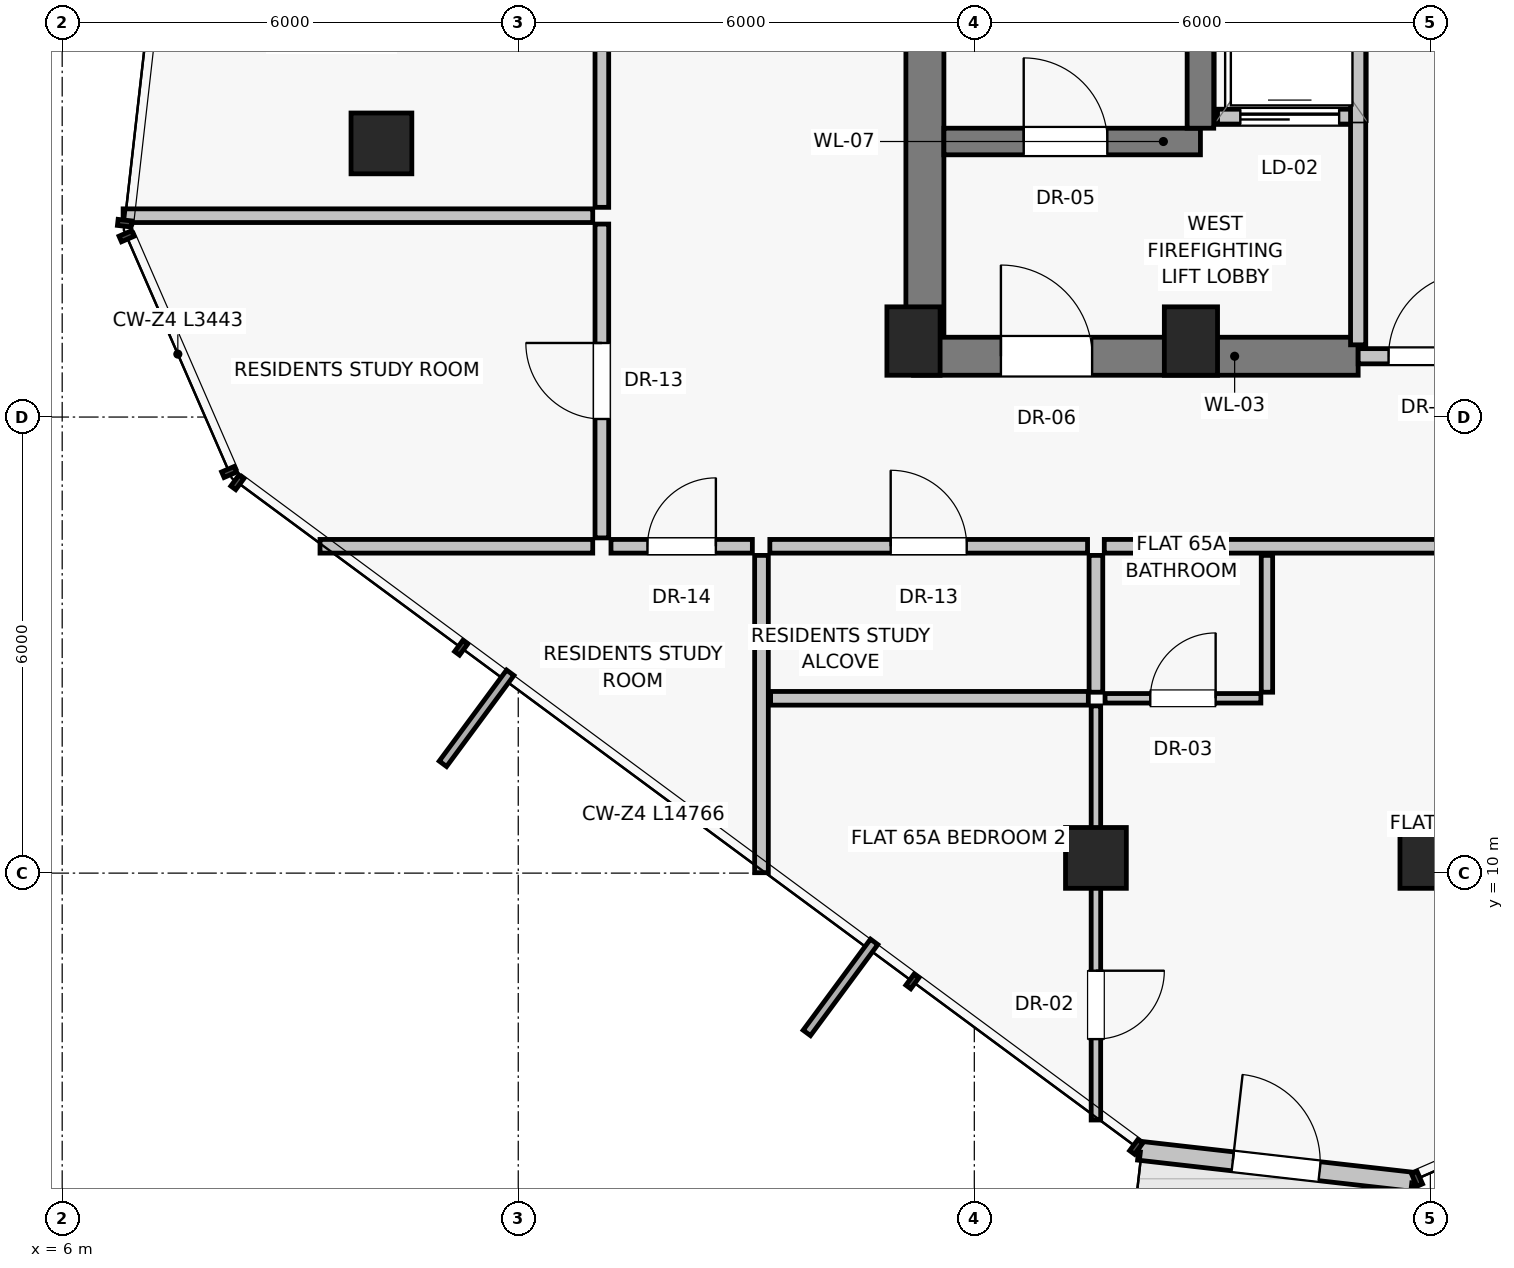
"""IFC4 building model, lengths in metres.
Left out: names, types, materials, properties, quantities, classifications, styles, units other than length and angle.
Written with IfcOpenShell. Run it as: python <this file> out.ifc"""

import sys

from ifc_helpers import new_model, si_unit, direction, frame, frame_2d, origin, origin_2d, place, context, subcontext, project, spatial, rectangle, extrude, source, transform, mapped, element, fill, save


model = new_model("IFC4")
c1 = context("Model", 3, precision=1e-05, world=origin(), true_north=direction((0.0, 1.0)))
c2 = subcontext(c1, "Body", "Model", "MODEL_VIEW")
j1 = project(units=[si_unit("LENGTHUNIT", "METRE"), si_unit("PLANEANGLEUNIT", "RADIAN")], contexts=[c1])
p1 = place(None, origin())
s1 = spatial("IfcSite", under=j1, at=p1, CompositionType="ELEMENT")
p2 = place(p1, origin())
s2 = spatial("IfcBuilding", under=s1, at=p2, CompositionType="ELEMENT")
p3 = place(p2, frame((0.0, 0.0, 230.05)))
s3 = spatial("IfcBuildingStorey", under=s2, at=p3, CompositionType="ELEMENT", Elevation=230.05)
for number, where, z_axis, x_axis in (
    (1, (17.2, 17.0, 0.0), (0.0, 0.0, 1.0), (1.0, 0.0, 0.0)),
    (2, (20.85, 17.0, 0.0), (0.0, 0.0, 1.0), (1.0, 0.0, 0.0)),
):
    element("IfcColumn", number, at=place(p3, frame(where, z_axis=z_axis, x_axis=x_axis)), inside=s3, PredefinedType="PILASTER", context=c2, shape_type="SweptSolid", body=[
        extrude(rectangle(XDim=0.7, YDim=0.9, at=origin_2d()), origin(), (0.0, 0.0, 1.0), 3.25),
    ])
for number, where, z_axis, x_axis in (
    (3, (10.2, 19.6, -0.235), (0.0, 0.0, 1.0), (1.0, 0.0, 0.0)),
    (4, (19.6, 10.2, -0.235), (0.0, 0.0, 1.0), (1.0, 0.0, 0.0)),
    (5, (24.0, 10.2, -0.235), (0.0, 0.0, 1.0), (1.0, 0.0, 0.0)),
):
    element("IfcColumn", number, at=place(p3, frame(where, z_axis=z_axis, x_axis=x_axis)), inside=s3, PredefinedType="COLUMN", context=c2, shape_type="SweptSolid", body=[
        extrude(rectangle(XDim=0.8, YDim=0.8, at=origin_2d()), origin(), (0.0, 0.0, 1.0), 3.485),
    ])
p4 = place(p3, frame((20.162, 6.349, 0.0), z_axis=(0.0, 0.0, 1.0), x_axis=(0.993617723706, -0.112799907521, 0.0)))
e6 = element("IfcWall", 6, at=p4, inside=s3, PredefinedType="SOLIDWALL", context=c2, shape_type="SweptSolid", body=[
    extrude(rectangle(XDim=3.643, YDim=0.25, at=frame_2d((1.821, 0.0))), origin(), (0.0, 0.0, 1.0), 3.015),
])
p5 = place(p4, frame((1.246, 0.0, 0.0)))
e7 = element("IfcOpeningElement", 7, at=p5, cuts=e6, PredefinedType="OPENING", context=c2, shape_type="SweptSolid", body=[
    extrude(rectangle(XDim=1.15, YDim=2.25, at=frame_2d((0.575, 1.125))), frame((0.0, 0.135, 0.0), z_axis=(0.0, -1.0, 0.0), x_axis=(1.0, 0.0, 0.0)), (0.0, 0.0, 1.0), 0.27),
])
p6 = place(p3, frame((17.35, 16.8, 0.0), z_axis=(0.0, 0.0, 1.0), x_axis=(0.0, 1.0, 0.0)))
e8 = element("IfcWall", 8, at=p6, inside=s3, PredefinedType="SHEAR", context=c2, shape_type="SweptSolid", body=[
    extrude(rectangle(XDim=14.2, YDim=0.5, at=frame_2d((7.1, 0.0))), origin(), (0.0, 0.0, 1.0), 3.015),
])
p7 = place(p3, frame((17.2, 16.8, 0.0), z_axis=(0.0, 0.0, 1.0), x_axis=(1.0, 0.0, 0.0)))
e9 = element("IfcWall", 9, at=p7, inside=s3, PredefinedType="SHEAR", context=c2, shape_type="SweptSolid", body=[
    extrude(rectangle(XDim=5.85, YDim=0.5, at=frame_2d((2.925, 0.0))), origin(), (0.0, 0.0, 1.0), 3.015),
])
p8 = place(p7, frame((1.15, 0.0, 0.0)))
e10 = element("IfcOpeningElement", 10, at=p8, cuts=e9, PredefinedType="OPENING", context=c2, shape_type="SweptSolid", body=[
    extrude(rectangle(XDim=1.2, YDim=2.03, at=frame_2d((0.6, 1.015))), frame((0.0, 0.26, 0.0), z_axis=(0.0, -1.0, 0.0), x_axis=(1.0, 0.0, 0.0)), (0.0, 0.0, 1.0), 0.52),
])
p9 = place(p3, frame((23.05, 16.8, 0.0), z_axis=(0.0, 0.0, 1.0), x_axis=(1.0, 0.0, 0.0)))
e11 = element("IfcWall", 11, at=p9, inside=s3, PredefinedType="SOLIDWALL", context=c2, shape_type="SweptSolid", body=[
    extrude(rectangle(XDim=1.9, YDim=0.2, at=frame_2d((0.95, 0.0))), origin(), (0.0, 0.0, 1.0), 2.165),
])
p10 = place(p9, frame((0.4, 0.0, 0.0)))
e12 = element("IfcOpeningElement", 12, at=p10, cuts=e11, PredefinedType="OPENING", context=c2, shape_type="SweptSolid", body=[
    extrude(rectangle(XDim=1.1, YDim=2.03, at=frame_2d((0.55, 1.015))), frame((0.0, 0.11, 0.0), z_axis=(0.0, -1.0, 0.0), x_axis=(1.0, 0.0, 0.0)), (0.0, 0.0, 1.0), 0.22),
])
p11 = place(p3, frame((17.6, 19.625, 0.0), z_axis=(0.0, 0.0, 1.0), x_axis=(1.0, 0.0, 0.0)))
e13 = element("IfcWall", 13, at=p11, inside=s3, PredefinedType="SHEAR", context=c2, shape_type="SweptSolid", body=[
    extrude(rectangle(XDim=3.375, YDim=0.35, at=frame_2d((1.688, 0.0))), origin(), (0.0, 0.0, 1.0), 3.015),
])
p12 = place(p11, frame((1.05, 0.0, 0.0)))
e14 = element("IfcOpeningElement", 14, at=p12, cuts=e13, PredefinedType="OPENING", context=c2, shape_type="SweptSolid", body=[
    extrude(rectangle(XDim=1.1, YDim=2.03, at=frame_2d((0.55, 1.015))), frame((0.0, 0.185, 0.0), z_axis=(0.0, -1.0, 0.0), x_axis=(1.0, 0.0, 0.0)), (0.0, 0.0, 1.0), 0.37),
])
p13 = place(p3, frame((21.2, 19.95, 0.0), z_axis=(0.0, 0.0, 1.0), x_axis=(1.0, 0.0, 0.0)))
e15 = element("IfcWall", 15, at=p13, inside=s3, PredefinedType="SOLIDWALL", context=c2, shape_type="SweptSolid", body=[
    extrude(rectangle(XDim=1.85, YDim=0.2, at=frame_2d((0.925, 0.0))), origin(), (0.0, 0.0, 1.0), 3.015),
])
p14 = place(p13, frame((0.3, 0.0, 0.0)))
e16 = element("IfcOpeningElement", 16, at=p14, cuts=e15, PredefinedType="OPENING", context=c2, shape_type="SweptSolid", body=[
    extrude(rectangle(XDim=1.3, YDim=2.25, at=frame_2d((0.65, 1.125))), frame((0.0, 0.11, 0.0), z_axis=(0.0, -1.0, 0.0), x_axis=(1.0, 0.0, 0.0)), (0.0, 0.0, 1.0), 0.22),
])
p15 = place(p3, frame((20.975, 19.8, 0.0), z_axis=(0.0, 0.0, 1.0), x_axis=(0.0, 1.0, 0.0)))
e17 = element("IfcWall", 17, at=p15, inside=s3, PredefinedType="SHEAR", context=c2, shape_type="SweptSolid", body=[
    extrude(rectangle(XDim=8.775, YDim=0.35, at=frame_2d((4.387, 0.0))), origin(), (0.0, 0.0, 1.0), 3.015),
])
p16 = place(p3, frame((23.05, 16.95, 0.0), z_axis=(0.0, 0.0, 1.0), x_axis=(0.0, 1.0, 0.0)))
e18 = element("IfcWall", 18, at=p16, inside=s3, PredefinedType="SOLIDWALL", context=c2, shape_type="SweptSolid", body=[
    extrude(rectangle(XDim=5.6, YDim=0.2, at=frame_2d((2.8, 0.0))), origin(), (0.0, 0.0, 1.0), 3.015),
])
p17 = place(p3, frame((15.2, 14.18, 0.0), z_axis=(0.0, 0.0, 1.0), x_axis=(0.0, -1.0, 0.0)))
e19 = element("IfcWall", 19, at=p17, inside=s3, PredefinedType="PARTITIONING", context=c2, shape_type="SweptSolid", body=[
    extrude(rectangle(XDim=4.175, YDim=0.18, at=frame_2d((2.087, 0.0))), origin(), (0.0, 0.0, 1.0), 3.015),
])
p18 = place(p3, frame((15.31, 14.3, 0.0), z_axis=(0.0, 0.0, 1.0), x_axis=(1.0, 0.0, 0.0)))
e20 = element("IfcWall", 20, at=p18, inside=s3, PredefinedType="PARTITIONING", context=c2, shape_type="SweptSolid", body=[
    extrude(rectangle(XDim=4.18, YDim=0.18, at=frame_2d((2.09, 0.0))), origin(), (0.0, 0.0, 1.0), 3.015),
])
p19 = place(p18, frame((1.59, 0.0, 0.0)))
e21 = element("IfcOpeningElement", 21, at=p19, cuts=e20, PredefinedType="OPENING", context=c2, shape_type="SweptSolid", body=[
    extrude(rectangle(XDim=1.0, YDim=2.01, at=frame_2d((0.5, 1.005))), frame((0.0, 0.1, 0.0), z_axis=(0.0, -1.0, 0.0), x_axis=(1.0, 0.0, 0.0)), (0.0, 0.0, 1.0), 0.2),
])
p20 = place(p3, frame((19.71, 14.3, 0.0), z_axis=(0.0, 0.0, 1.0), x_axis=(1.0, 0.0, 0.0)))
e22 = element("IfcWall", 22, at=p20, inside=s3, PredefinedType="PARTITIONING", context=c2, shape_type="SweptSolid", body=[
    extrude(rectangle(XDim=11.38, YDim=0.18, at=frame_2d((5.69, 0.0))), origin(), (0.0, 0.0, 1.0), 3.015),
])
p21 = place(p20, frame((4.94, 0.0, 0.0)))
e23 = element("IfcOpeningElement", 23, at=p21, cuts=e22, PredefinedType="OPENING", context=c2, shape_type="SweptSolid", body=[
    extrude(rectangle(XDim=0.95, YDim=2.02, at=frame_2d((0.475, 1.01))), frame((0.0, 0.1, 0.0), z_axis=(0.0, -1.0, 0.0), x_axis=(1.0, 0.0, 0.0)), (0.0, 0.0, 1.0), 0.2),
])
p22 = place(p3, frame((15.32, 12.3, 0.0), z_axis=(0.0, 0.0, 1.0), x_axis=(1.0, 0.0, 0.0)))
e24 = element("IfcWall", 24, at=p22, inside=s3, PredefinedType="PARTITIONING", context=c2, shape_type="SweptSolid", body=[
    extrude(rectangle(XDim=4.18, YDim=0.18, at=frame_2d((2.09, 0.0))), origin(), (0.0, 0.0, 1.0), 3.015),
])
p23 = place(p3, frame((19.6, 14.18, 0.0), z_axis=(0.0, 0.0, 1.0), x_axis=(0.0, -1.0, 0.0)))
e25 = element("IfcWall", 25, at=p23, inside=s3, PredefinedType="PARTITIONING", context=c2, shape_type="SweptSolid", body=[
    extrude(rectangle(XDim=1.8, YDim=0.18, at=frame_2d((0.9, 0.0))), origin(), (0.0, 0.0, 1.0), 2.543),
])
p24 = place(p3, frame((19.6, 12.2, 0.0), z_axis=(0.0, 0.0, 1.0), x_axis=(0.0, -1.0, 0.0)))
e26 = element("IfcWall", 26, at=p24, inside=s3, PredefinedType="PARTITIONING", context=c2, shape_type="SweptSolid", body=[
    extrude(rectangle(XDim=5.448, YDim=0.125, at=frame_2d((2.724, 0.0))), origin(), (0.0, 0.0, 1.0), 2.543),
])
p25 = place(p24, frame((3.484, 0.0, 0.0)))
e27 = element("IfcOpeningElement", 27, at=p25, cuts=e26, PredefinedType="OPENING", context=c2, shape_type="SweptSolid", body=[
    extrude(rectangle(XDim=0.9, YDim=2.01, at=frame_2d((0.45, 1.005))), frame((0.0, 0.073, 0.0), z_axis=(0.0, -1.0, 0.0), x_axis=(1.0, 0.0, 0.0)), (0.0, 0.0, 1.0), 0.145),
])
p26 = place(p3, frame((21.85, 14.18, 0.0), z_axis=(0.0, 0.0, 1.0), x_axis=(0.0, -1.0, 0.0)))
e28 = element("IfcWall", 28, at=p26, inside=s3, PredefinedType="PARTITIONING", context=c2, shape_type="SweptSolid", body=[
    extrude(rectangle(XDim=1.8, YDim=0.15, at=frame_2d((0.9, 0.0))), origin(), (0.0, 0.0, 1.0), 3.015),
])
p27 = place(p3, frame((19.72, 12.3, 0.0), z_axis=(0.0, 0.0, 1.0), x_axis=(1.0, 0.0, 0.0)))
e29 = element("IfcWall", 29, at=p27, inside=s3, PredefinedType="PARTITIONING", context=c2, shape_type="SweptSolid", body=[
    extrude(rectangle(XDim=2.05, YDim=0.125, at=frame_2d((1.025, 0.0))), origin(), (0.0, 0.0, 1.0), 3.015),
])
p28 = place(p27, frame((0.595, 0.0, 0.0)))
e30 = element("IfcOpeningElement", 30, at=p28, cuts=e29, PredefinedType="OPENING", context=c2, shape_type="SweptSolid", body=[
    extrude(rectangle(XDim=0.86, YDim=2.01, at=frame_2d((0.43, 1.005))), frame((0.0, 0.073, 0.0), z_axis=(0.0, -1.0, 0.0), x_axis=(1.0, 0.0, 0.0)), (0.0, 0.0, 1.0), 0.145),
])
p29 = place(p3, frame((12.98, 14.3, 0.0), z_axis=(0.0, 0.0, 1.0), x_axis=(-1.0, 0.0, 0.0)))
e31 = element("IfcWall", 31, at=p29, inside=s3, PredefinedType="PARTITIONING", context=c2, shape_type="SweptSolid", body=[
    extrude(rectangle(XDim=3.588, YDim=0.18, at=frame_2d((1.794, 0.0))), origin(), (0.0, 0.0, 1.0), 3.015),
])
p30 = place(p3, frame((13.1, 14.41, 0.0), z_axis=(0.0, 0.0, 1.0), x_axis=(0.0, 1.0, 0.0)))
e32 = element("IfcWall", 32, at=p30, inside=s3, PredefinedType="PARTITIONING", context=c2, shape_type="SweptSolid", body=[
    extrude(rectangle(XDim=4.129, YDim=0.18, at=frame_2d((2.064, 0.0))), origin(), (0.0, 0.0, 1.0), 2.662),
])
p31 = place(p30, frame((1.564, 0.0, 0.0)))
e33 = element("IfcOpeningElement", 33, at=p31, cuts=e32, PredefinedType="OPENING", context=c2, shape_type="SweptSolid", body=[
    extrude(rectangle(XDim=1.0, YDim=2.01, at=frame_2d((0.5, 1.005))), frame((0.0, 0.1, 0.0), z_axis=(0.0, -1.0, 0.0), x_axis=(1.0, 0.0, 0.0)), (0.0, 0.0, 1.0), 0.2),
])
p32 = place(p3, frame((13.1, 18.759, 0.0), z_axis=(0.0, 0.0, 1.0), x_axis=(0.0, 1.0, 0.0)))
e34 = element("IfcWall", 34, at=p32, inside=s3, PredefinedType="PARTITIONING", context=c2, shape_type="SweptSolid", body=[
    extrude(rectangle(XDim=6.875, YDim=0.18, at=frame_2d((3.438, 0.0))), origin(), (0.0, 0.0, 1.0), 2.662),
])
p33 = place(p32, frame((2.938, 0.0, 0.0)))
e35 = element("IfcOpeningElement", 35, at=p33, cuts=e34, PredefinedType="OPENING", context=c2, shape_type="SweptSolid", body=[
    extrude(rectangle(XDim=1.0, YDim=2.01, at=frame_2d((0.5, 1.005))), frame((0.0, 0.1, 0.0), z_axis=(0.0, -1.0, 0.0), x_axis=(1.0, 0.0, 0.0)), (0.0, 0.0, 1.0), 0.2),
])
p34 = place(p3, frame((12.98, 18.649, 0.0), z_axis=(0.0, 0.0, 1.0), x_axis=(-1.0, 0.0, 0.0)))
e36 = element("IfcWall", 36, at=p34, inside=s3, PredefinedType="PARTITIONING", context=c2, shape_type="SweptSolid", body=[
    extrude(rectangle(XDim=6.178, YDim=0.18, at=frame_2d((3.089, 0.0))), origin(), (0.0, 0.0, 1.0), 3.015),
])
p35 = place(p3, frame((13.22, 14.3, 0.0), z_axis=(0.0, 0.0, 1.0), x_axis=(1.0, 0.0, 0.0)))
e37 = element("IfcWall", 37, at=p35, inside=s3, PredefinedType="PARTITIONING", context=c2, shape_type="SweptSolid", body=[
    extrude(rectangle(XDim=1.86, YDim=0.18, at=frame_2d((0.93, 0.0))), origin(), (0.0, 0.0, 1.0), 3.015),
])
p36 = place(p35, frame((0.48, 0.0, 0.0)))
e38 = element("IfcOpeningElement", 38, at=p36, cuts=e37, PredefinedType="OPENING", context=c2, shape_type="SweptSolid", body=[
    extrude(rectangle(XDim=0.9, YDim=2.01, at=frame_2d((0.45, 1.005))), frame((0.0, 0.1, 0.0), z_axis=(0.0, -1.0, 0.0), x_axis=(1.0, 0.0, 0.0)), (0.0, 0.0, 1.0), 0.2),
])
m1 = source(origin(), c2, "Body", "SweptSolid", [
    extrude(rectangle(XDim=1.15, YDim=2.25, at=frame_2d((0.575, 1.125))), frame((0.0, 0.025, 0.0), z_axis=(0.0, -1.0, 0.0), x_axis=(1.0, 0.0, 0.0)), (0.0, 0.0, 1.0), 0.05),
])
p37 = place(p5, frame((1.15, 0.0, 0.0), z_axis=(0.0, 0.0, 1.0), x_axis=(-1.0, 0.0, 0.0)))
e39 = element("IfcDoor", 39, at=p37, inside=s3, OperationType="SINGLE_SWING_LEFT", PredefinedType="DOOR", context=c2, shape_type="MappedRepresentation", body=[
    mapped(m1, transform((0.0, 0.0, 0.0), scale=1.0)),
])
fill(e7, e39)
m2 = source(origin(), c2, "Body", "SweptSolid", [
    extrude(rectangle(XDim=1.2, YDim=2.03, at=frame_2d((0.6, 1.015))), frame((0.0, 0.025, 0.0), z_axis=(0.0, -1.0, 0.0), x_axis=(1.0, 0.0, 0.0)), (0.0, 0.0, 1.0), 0.05),
])
p38 = place(p8, origin())
e40 = element("IfcDoor", 40, at=p38, inside=s3, OperationType="SINGLE_SWING_LEFT", PredefinedType="DOOR", context=c2, shape_type="MappedRepresentation", body=[
    mapped(m2, transform((0.0, 0.0, 0.0), scale=1.0)),
])
fill(e10, e40)
m3 = source(origin(), c2, "Body", "SweptSolid", [
    extrude(rectangle(XDim=1.1, YDim=2.03, at=frame_2d((0.55, 1.015))), frame((0.0, 0.025, 0.0), z_axis=(0.0, -1.0, 0.0), x_axis=(1.0, 0.0, 0.0)), (0.0, 0.0, 1.0), 0.05),
])
p39 = place(p10, origin())
e41 = element("IfcDoor", 41, at=p39, inside=s3, OperationType="SINGLE_SWING_RIGHT", PredefinedType="DOOR", context=c2, shape_type="MappedRepresentation", body=[
    mapped(m3, transform((0.0, 0.0, 0.0), scale=1.0)),
])
fill(e12, e41)
p40 = place(p12, origin())
e42 = element("IfcDoor", 42, at=p40, inside=s3, OperationType="SINGLE_SWING_LEFT", PredefinedType="DOOR", context=c2, shape_type="MappedRepresentation", body=[
    mapped(m3, transform((0.0, 0.0, 0.0), scale=1.0)),
])
fill(e14, e42)
m4 = source(origin(), c2, "Body", "SweptSolid", [
    extrude(rectangle(XDim=1.3, YDim=2.25, at=frame_2d((0.65, 1.125))), frame((0.0, 0.025, 0.0), z_axis=(0.0, -1.0, 0.0), x_axis=(1.0, 0.0, 0.0)), (0.0, 0.0, 1.0), 0.05),
])
p41 = place(p14, origin())
e43 = element("IfcDoor", 43, at=p41, inside=s3, OperationType="SLIDING_TO_LEFT", PredefinedType="DOOR", context=c2, shape_type="MappedRepresentation", body=[
    mapped(m4, transform((0.0, 0.0, 0.0), scale=1.0)),
])
fill(e16, e43)
m5 = source(origin(), c2, "Body", "SweptSolid", [
    extrude(rectangle(XDim=1.0, YDim=2.01, at=frame_2d((0.5, 1.005))), frame((0.0, 0.025, 0.0), z_axis=(0.0, -1.0, 0.0), x_axis=(1.0, 0.0, 0.0)), (0.0, 0.0, 1.0), 0.05),
])
p42 = place(p19, origin())
e44 = element("IfcDoor", 44, at=p42, inside=s3, OperationType="SINGLE_SWING_LEFT", PredefinedType="DOOR", context=c2, shape_type="MappedRepresentation", body=[
    mapped(m5, transform((0.0, 0.0, 0.0), scale=1.0)),
])
fill(e21, e44)
m6 = source(origin(), c2, "Body", "SweptSolid", [
    extrude(rectangle(XDim=0.9, YDim=2.01, at=frame_2d((0.45, 1.005))), frame((0.0, 0.025, 0.0), z_axis=(0.0, -1.0, 0.0), x_axis=(1.0, 0.0, 0.0)), (0.0, 0.0, 1.0), 0.05),
])
p43 = place(p25, origin())
e45 = element("IfcDoor", 45, at=p43, inside=s3, OperationType="SINGLE_SWING_LEFT", PredefinedType="DOOR", context=c2, shape_type="MappedRepresentation", body=[
    mapped(m6, transform((0.0, 0.0, 0.0), scale=1.0)),
])
fill(e27, e45)
m7 = source(origin(), c2, "Body", "SweptSolid", [
    extrude(rectangle(XDim=0.86, YDim=2.01, at=frame_2d((0.43, 1.005))), frame((0.0, 0.025, 0.0), z_axis=(0.0, -1.0, 0.0), x_axis=(1.0, 0.0, 0.0)), (0.0, 0.0, 1.0), 0.05),
])
p44 = place(p28, origin())
e46 = element("IfcDoor", 46, at=p44, inside=s3, OperationType="SINGLE_SWING_RIGHT", PredefinedType="DOOR", context=c2, shape_type="MappedRepresentation", body=[
    mapped(m7, transform((0.0, 0.0, 0.0), scale=1.0)),
])
fill(e30, e46)
p45 = place(p31, origin())
e47 = element("IfcDoor", 47, at=p45, inside=s3, OperationType="SINGLE_SWING_RIGHT", PredefinedType="DOOR", context=c2, shape_type="MappedRepresentation", body=[
    mapped(m5, transform((0.0, 0.0, 0.0), scale=1.0)),
])
fill(e33, e47)
p46 = place(p36, origin())
e48 = element("IfcDoor", 48, at=p46, inside=s3, OperationType="SINGLE_SWING_RIGHT", PredefinedType="DOOR", context=c2, shape_type="MappedRepresentation", body=[
    mapped(m6, transform((0.0, 0.0, 0.0), scale=1.0)),
])
fill(e38, e48)
save(model, sys.argv[1])
